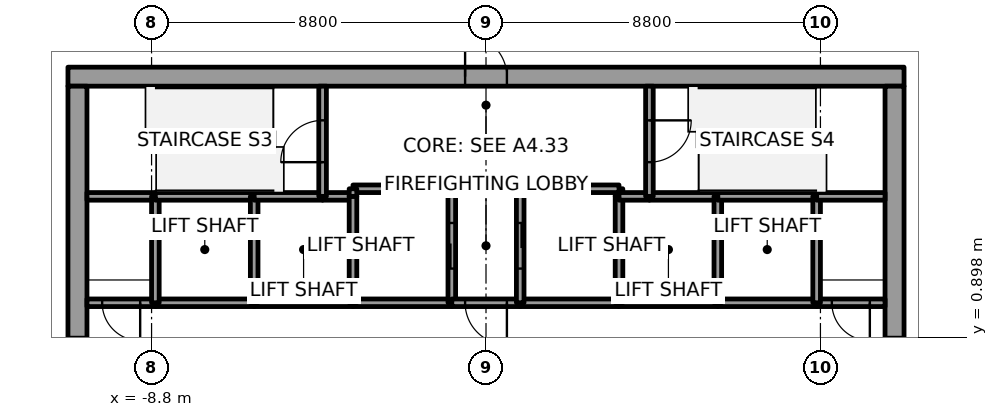
"""IFC4 building model, lengths in metres.
Left out: names, types, materials, properties, quantities, classifications, styles, units other than length and angle.
Written with IfcOpenShell. Run it as: python <this file> out.ifc"""

import sys

from ifc_helpers import new_model, si_unit, direction, frame, frame_2d, origin, place, context, subcontext, project, spatial, rectangle, extrude, element, fill, save


model = new_model("IFC4")
c1 = context("Model", 3, precision=1e-05, world=origin(), true_north=direction((0.0, 1.0)))
c2 = subcontext(c1, "Body", "Model", "MODEL_VIEW")
j1 = project(units=[si_unit("LENGTHUNIT", "METRE"), si_unit("PLANEANGLEUNIT", "RADIAN")], contexts=[c1])
p1 = place(None, origin())
s1 = spatial("IfcSite", under=j1, at=p1, CompositionType="ELEMENT")
p2 = place(p1, origin())
s2 = spatial("IfcBuilding", under=s1, at=p2, CompositionType="ELEMENT")
p3 = place(p2, frame((0.0, 0.0, 145.8)))
s3 = spatial("IfcBuildingStorey", under=s2, at=p3, CompositionType="ELEMENT", Elevation=145.8)
p4 = place(p3, frame((-11.0, 7.75, 0.0), z_axis=(0.0, 0.0, 1.0), x_axis=(1.0, 0.0, 0.0)))
e1 = element("IfcWall", 1, at=p4, inside=s3, PredefinedType="SHEAR", context=c2, shape_type="SweptSolid", body=[
    extrude(rectangle(XDim=22.0, YDim=0.5, at=frame_2d((11.0, 0.0))), origin(), (0.0, 0.0, 1.0), 4.0),
])
p5 = place(p4, frame((10.45, 0.0, 0.0)))
e2 = element("IfcOpeningElement", 2, at=p5, cuts=e1, PredefinedType="OPENING", context=c2, shape_type="SweptSolid", body=[
    extrude(rectangle(XDim=1.1, YDim=2.1, at=frame_2d((0.55, 1.05))), frame((0.0, 0.25, 0.0), z_axis=(0.0, -1.0, 0.0), x_axis=(1.0, 0.0, 0.0)), (0.0, 0.0, 1.0), 0.5),
])
p6 = place(p3, frame((-10.75, -7.5, 0.0), z_axis=(0.0, 0.0, 1.0), x_axis=(0.0, 1.0, 0.0)))
e3 = element("IfcWall", 3, at=p6, inside=s3, PredefinedType="SHEAR", context=c2, shape_type="SweptSolid", body=[
    extrude(rectangle(XDim=15.0, YDim=0.5, at=frame_2d((7.5, 0.0))), origin(), (0.0, 0.0, 1.0), 4.0),
])
p7 = place(p6, frame((6.6, 0.0, 0.0)))
e4 = element("IfcOpeningElement", 4, at=p7, cuts=e3, PredefinedType="OPENING", context=c2, shape_type="SweptSolid", body=[
    extrude(rectangle(XDim=1.8, YDim=2.1, at=frame_2d((0.9, 1.05))), frame((0.0, 0.25, 0.0), z_axis=(0.0, -1.0, 0.0), x_axis=(1.0, 0.0, 0.0)), (0.0, 0.0, 1.0), 0.5),
])
p8 = place(p3, frame((10.75, -7.5, 0.0), z_axis=(0.0, 0.0, 1.0), x_axis=(0.0, 1.0, 0.0)))
e5 = element("IfcWall", 5, at=p8, inside=s3, PredefinedType="SHEAR", context=c2, shape_type="SweptSolid", body=[
    extrude(rectangle(XDim=15.0, YDim=0.5, at=frame_2d((7.5, 0.0))), origin(), (0.0, 0.0, 1.0), 4.0),
])
p9 = place(p8, frame((6.6, 0.0, 0.0)))
e6 = element("IfcOpeningElement", 6, at=p9, cuts=e5, PredefinedType="OPENING", context=c2, shape_type="SweptSolid", body=[
    extrude(rectangle(XDim=1.8, YDim=2.1, at=frame_2d((0.9, 1.05))), frame((0.0, 0.25, 0.0), z_axis=(0.0, -1.0, 0.0), x_axis=(1.0, 0.0, 0.0)), (0.0, 0.0, 1.0), 0.5),
])
p10 = place(p3, frame((-8.7, 1.8, 0.0), z_axis=(0.0, 0.0, 1.0), x_axis=(-1.0, 0.0, 0.0)))
e7 = element("IfcWall", 7, at=p10, inside=s3, PredefinedType="SOLIDWALL", context=c2, shape_type="SweptSolid", body=[
    extrude(rectangle(XDim=1.8, YDim=0.2, at=frame_2d((0.9, 0.0))), origin(), (0.0, 0.0, 1.0), 3.85),
])
p11 = place(p10, frame((0.4, 0.0, 0.0)))
e8 = element("IfcOpeningElement", 8, at=p11, cuts=e7, PredefinedType="OPENING", context=c2, shape_type="SweptSolid", body=[
    extrude(rectangle(XDim=1.0, YDim=2.1, at=frame_2d((0.5, 1.05))), frame((0.0, 0.1, 0.0), z_axis=(0.0, -1.0, 0.0), x_axis=(1.0, 0.0, 0.0)), (0.0, 0.0, 1.0), 0.2),
])
p12 = place(p3, frame((-8.7, 4.6, 0.0), z_axis=(0.0, 0.0, 1.0), x_axis=(-1.0, 0.0, 0.0)))
e9 = element("IfcWall", 9, at=p12, inside=s3, PredefinedType="SOLIDWALL", context=c2, shape_type="SweptSolid", body=[
    extrude(rectangle(XDim=1.8, YDim=0.2, at=frame_2d((0.9, 0.0))), origin(), (0.0, 0.0, 1.0), 3.85),
])
p13 = place(p3, frame((-6.1, 1.8, 0.0), z_axis=(0.0, 0.0, 1.0), x_axis=(-1.0, 0.0, 0.0)))
e10 = element("IfcWall", 10, at=p13, inside=s3, PredefinedType="SOLIDWALL", context=c2, shape_type="SweptSolid", body=[
    extrude(rectangle(XDim=2.6, YDim=0.2, at=frame_2d((1.3, 0.0))), origin(), (0.0, 0.0, 1.0), 3.85),
])
p14 = place(p3, frame((-8.7, 1.8, 0.0), z_axis=(0.0, 0.0, 1.0), x_axis=(0.0, 1.0, 0.0)))
e11 = element("IfcWall", 11, at=p14, inside=s3, PredefinedType="SOLIDWALL", context=c2, shape_type="SweptSolid", body=[
    extrude(rectangle(XDim=2.8, YDim=0.2, at=frame_2d((1.4, 0.0))), origin(), (0.0, 0.0, 1.0), 3.85),
])
p15 = place(p3, frame((-6.1, 4.6, 0.0), z_axis=(0.0, 0.0, 1.0), x_axis=(-1.0, 0.0, 0.0)))
e12 = element("IfcWall", 12, at=p15, inside=s3, PredefinedType="SOLIDWALL", context=c2, shape_type="SweptSolid", body=[
    extrude(rectangle(XDim=2.6, YDim=0.2, at=frame_2d((1.3, 0.0))), origin(), (0.0, 0.0, 1.0), 3.85),
])
p16 = place(p3, frame((-3.5, 1.8, 0.0), z_axis=(0.0, 0.0, 1.0), x_axis=(-1.0, 0.0, 0.0)))
e13 = element("IfcWall", 13, at=p16, inside=s3, PredefinedType="SOLIDWALL", context=c2, shape_type="SweptSolid", body=[
    extrude(rectangle(XDim=2.6, YDim=0.2, at=frame_2d((1.3, 0.0))), origin(), (0.0, 0.0, 1.0), 3.85),
])
p17 = place(p3, frame((-6.1, 1.8, 0.0), z_axis=(0.0, 0.0, 1.0), x_axis=(0.0, 1.0, 0.0)))
e14 = element("IfcWall", 14, at=p17, inside=s3, PredefinedType="SOLIDWALL", context=c2, shape_type="SweptSolid", body=[
    extrude(rectangle(XDim=2.8, YDim=0.2, at=frame_2d((1.4, 0.0))), origin(), (0.0, 0.0, 1.0), 3.85),
])
p18 = place(p3, frame((-4.3, 4.6, 0.0), z_axis=(0.0, 0.0, 1.0), x_axis=(-1.0, 0.0, 0.0)))
e15 = element("IfcWall", 15, at=p18, inside=s3, PredefinedType="SOLIDWALL", context=c2, shape_type="SweptSolid", body=[
    extrude(rectangle(XDim=1.8, YDim=0.2, at=frame_2d((0.9, 0.0))), origin(), (0.0, 0.0, 1.0), 3.85),
])
p19 = place(p3, frame((-3.5, 4.6, 0.0), z_axis=(0.0, 0.0, 1.0), x_axis=(-1.0, 0.0, 0.0)))
e16 = element("IfcWall", 16, at=p19, inside=s3, PredefinedType="SOLIDWALL", context=c2, shape_type="SweptSolid", body=[
    extrude(rectangle(XDim=0.8, YDim=0.2, at=frame_2d((0.4, 0.0))), origin(), (0.0, 0.0, 1.0), 3.85),
])
p20 = place(p3, frame((-4.3, 4.6, 0.0), z_axis=(0.0, 0.0, 1.0), x_axis=(0.0, 1.0, 0.0)))
e17 = element("IfcWall", 17, at=p20, inside=s3, PredefinedType="SOLIDWALL", context=c2, shape_type="SweptSolid", body=[
    extrude(rectangle(XDim=2.9, YDim=0.2, at=frame_2d((1.45, 0.0))), origin(), (0.0, 0.0, 1.0), 3.85),
])
p21 = place(p20, frame((0.9, 0.0, 0.0)))
e18 = element("IfcOpeningElement", 18, at=p21, cuts=e17, PredefinedType="OPENING", context=c2, shape_type="SweptSolid", body=[
    extrude(rectangle(XDim=1.1, YDim=2.1, at=frame_2d((0.55, 1.05))), frame((0.0, 0.1, 0.0), z_axis=(0.0, -1.0, 0.0), x_axis=(1.0, 0.0, 0.0)), (0.0, 0.0, 1.0), 0.2),
])
p22 = place(p3, frame((-0.9, 1.8, 0.0), z_axis=(0.0, 0.0, 1.0), x_axis=(-1.0, 0.0, 0.0)))
e19 = element("IfcWall", 19, at=p22, inside=s3, PredefinedType="SOLIDWALL", context=c2, shape_type="SweptSolid", body=[
    extrude(rectangle(XDim=2.6, YDim=0.2, at=frame_2d((1.3, 0.0))), origin(), (0.0, 0.0, 1.0), 3.85),
])
p23 = place(p3, frame((-3.5, 4.6, 0.0), z_axis=(0.0, 0.0, 1.0), x_axis=(0.0, -1.0, 0.0)))
e20 = element("IfcWall", 20, at=p23, inside=s3, PredefinedType="SOLIDWALL", context=c2, shape_type="SweptSolid", body=[
    extrude(rectangle(XDim=2.8, YDim=0.2, at=frame_2d((1.4, 0.0))), origin(), (0.0, 0.0, 1.0), 3.85),
])
p24 = place(p3, frame((-0.9, 1.8, 0.0), z_axis=(0.0, 0.0, 1.0), x_axis=(0.0, 1.0, 0.0)))
e21 = element("IfcWall", 21, at=p24, inside=s3, PredefinedType="SOLIDWALL", context=c2, shape_type="SweptSolid", body=[
    extrude(rectangle(XDim=3.0, YDim=0.2, at=frame_2d((1.5, 0.0))), origin(), (0.0, 0.0, 1.0), 3.85),
])
p25 = place(p24, frame((0.9, 0.0, 0.0)))
e22 = element("IfcOpeningElement", 22, at=p25, cuts=e21, PredefinedType="OPENING", context=c2, shape_type="SweptSolid", body=[
    extrude(rectangle(XDim=1.2, YDim=2.1, at=frame_2d((0.6, 1.05))), frame((0.0, 0.1, 0.0), z_axis=(0.0, -1.0, 0.0), x_axis=(1.0, 0.0, 0.0)), (0.0, 0.0, 1.0), 0.2),
])
p26 = place(p3, frame((-0.9, 4.8, 0.0), z_axis=(0.0, 0.0, 1.0), x_axis=(-1.0, 0.0, 0.0)))
e23 = element("IfcWall", 23, at=p26, inside=s3, PredefinedType="SOLIDWALL", context=c2, shape_type="SweptSolid", body=[
    extrude(rectangle(XDim=2.6, YDim=0.2, at=frame_2d((1.3, 0.0))), origin(), (0.0, 0.0, 1.0), 3.85),
])
p27 = place(p3, frame((-3.5, 4.8, 0.0), z_axis=(0.0, 0.0, 1.0), x_axis=(0.0, -1.0, 0.0)))
e24 = element("IfcWall", 24, at=p27, inside=s3, PredefinedType="SOLIDWALL", context=c2, shape_type="SweptSolid", body=[
    extrude(rectangle(XDim=0.2, YDim=0.2, at=frame_2d((0.1, 0.0))), origin(), (0.0, 0.0, 1.0), 3.85),
])
p28 = place(p3, frame((0.9, 1.8, 0.0), z_axis=(0.0, 0.0, 1.0), x_axis=(-1.0, 0.0, 0.0)))
e25 = element("IfcWall", 25, at=p28, inside=s3, PredefinedType="SOLIDWALL", context=c2, shape_type="SweptSolid", body=[
    extrude(rectangle(XDim=1.8, YDim=0.2, at=frame_2d((0.9, 0.0))), origin(), (0.0, 0.0, 1.0), 3.85),
])
p29 = place(p28, frame((0.35, 0.0, 0.0)))
e26 = element("IfcOpeningElement", 26, at=p29, cuts=e25, PredefinedType="OPENING", context=c2, shape_type="SweptSolid", body=[
    extrude(rectangle(XDim=1.1, YDim=2.1, at=frame_2d((0.55, 1.05))), frame((0.0, 0.1, 0.0), z_axis=(0.0, -1.0, 0.0), x_axis=(1.0, 0.0, 0.0)), (0.0, 0.0, 1.0), 0.2),
])
p30 = place(p3, frame((3.5, 1.8, 0.0), z_axis=(0.0, 0.0, 1.0), x_axis=(-1.0, 0.0, 0.0)))
e27 = element("IfcWall", 27, at=p30, inside=s3, PredefinedType="SOLIDWALL", context=c2, shape_type="SweptSolid", body=[
    extrude(rectangle(XDim=2.6, YDim=0.2, at=frame_2d((1.3, 0.0))), origin(), (0.0, 0.0, 1.0), 3.85),
])
p31 = place(p3, frame((3.5, 4.6, 0.0), z_axis=(0.0, 0.0, 1.0), x_axis=(0.0, 1.0, 0.0)))
e28 = element("IfcWall", 28, at=p31, inside=s3, PredefinedType="SOLIDWALL", context=c2, shape_type="SweptSolid", body=[
    extrude(rectangle(XDim=0.2, YDim=0.2, at=frame_2d((0.1, 0.0))), origin(), (0.0, 0.0, 1.0), 3.85),
])
p32 = place(p3, frame((3.5, 4.8, 0.0), z_axis=(0.0, 0.0, 1.0), x_axis=(-1.0, 0.0, 0.0)))
e29 = element("IfcWall", 29, at=p32, inside=s3, PredefinedType="SOLIDWALL", context=c2, shape_type="SweptSolid", body=[
    extrude(rectangle(XDim=2.6, YDim=0.2, at=frame_2d((1.3, 0.0))), origin(), (0.0, 0.0, 1.0), 3.85),
])
p33 = place(p3, frame((0.9, 4.8, 0.0), z_axis=(0.0, 0.0, 1.0), x_axis=(0.0, -1.0, 0.0)))
e30 = element("IfcWall", 30, at=p33, inside=s3, PredefinedType="SOLIDWALL", context=c2, shape_type="SweptSolid", body=[
    extrude(rectangle(XDim=3.0, YDim=0.2, at=frame_2d((1.5, 0.0))), origin(), (0.0, 0.0, 1.0), 3.85),
])
p34 = place(p33, frame((0.9, 0.0, 0.0)))
e31 = element("IfcOpeningElement", 31, at=p34, cuts=e30, PredefinedType="OPENING", context=c2, shape_type="SweptSolid", body=[
    extrude(rectangle(XDim=1.2, YDim=2.1, at=frame_2d((0.6, 1.05))), frame((0.0, 0.1, 0.0), z_axis=(0.0, -1.0, 0.0), x_axis=(1.0, 0.0, 0.0)), (0.0, 0.0, 1.0), 0.2),
])
p35 = place(p3, frame((6.1, 1.8, 0.0), z_axis=(0.0, 0.0, 1.0), x_axis=(-1.0, 0.0, 0.0)))
e32 = element("IfcWall", 32, at=p35, inside=s3, PredefinedType="SOLIDWALL", context=c2, shape_type="SweptSolid", body=[
    extrude(rectangle(XDim=2.6, YDim=0.2, at=frame_2d((1.3, 0.0))), origin(), (0.0, 0.0, 1.0), 3.85),
])
p36 = place(p3, frame((3.5, 1.8, 0.0), z_axis=(0.0, 0.0, 1.0), x_axis=(0.0, 1.0, 0.0)))
e33 = element("IfcWall", 33, at=p36, inside=s3, PredefinedType="SOLIDWALL", context=c2, shape_type="SweptSolid", body=[
    extrude(rectangle(XDim=2.8, YDim=0.2, at=frame_2d((1.4, 0.0))), origin(), (0.0, 0.0, 1.0), 3.85),
])
p37 = place(p3, frame((4.3, 4.6, 0.0), z_axis=(0.0, 0.0, 1.0), x_axis=(-1.0, 0.0, 0.0)))
e34 = element("IfcWall", 34, at=p37, inside=s3, PredefinedType="SOLIDWALL", context=c2, shape_type="SweptSolid", body=[
    extrude(rectangle(XDim=0.8, YDim=0.2, at=frame_2d((0.4, 0.0))), origin(), (0.0, 0.0, 1.0), 3.85),
])
p38 = place(p3, frame((6.1, 4.6, 0.0), z_axis=(0.0, 0.0, 1.0), x_axis=(-1.0, 0.0, 0.0)))
e35 = element("IfcWall", 35, at=p38, inside=s3, PredefinedType="SOLIDWALL", context=c2, shape_type="SweptSolid", body=[
    extrude(rectangle(XDim=1.8, YDim=0.2, at=frame_2d((0.9, 0.0))), origin(), (0.0, 0.0, 1.0), 3.85),
])
p39 = place(p3, frame((4.3, 7.5, 0.0), z_axis=(0.0, 0.0, 1.0), x_axis=(0.0, -1.0, 0.0)))
e36 = element("IfcWall", 36, at=p39, inside=s3, PredefinedType="SOLIDWALL", context=c2, shape_type="SweptSolid", body=[
    extrude(rectangle(XDim=2.9, YDim=0.2, at=frame_2d((1.45, 0.0))), origin(), (0.0, 0.0, 1.0), 3.85),
])
p40 = place(p39, frame((0.9, 0.0, 0.0)))
e37 = element("IfcOpeningElement", 37, at=p40, cuts=e36, PredefinedType="OPENING", context=c2, shape_type="SweptSolid", body=[
    extrude(rectangle(XDim=1.1, YDim=2.1, at=frame_2d((0.55, 1.05))), frame((0.0, 0.1, 0.0), z_axis=(0.0, -1.0, 0.0), x_axis=(1.0, 0.0, 0.0)), (0.0, 0.0, 1.0), 0.2),
])
p41 = place(p3, frame((8.7, 1.8, 0.0), z_axis=(0.0, 0.0, 1.0), x_axis=(-1.0, 0.0, 0.0)))
e38 = element("IfcWall", 38, at=p41, inside=s3, PredefinedType="SOLIDWALL", context=c2, shape_type="SweptSolid", body=[
    extrude(rectangle(XDim=2.6, YDim=0.2, at=frame_2d((1.3, 0.0))), origin(), (0.0, 0.0, 1.0), 3.85),
])
p42 = place(p3, frame((6.1, 1.8, 0.0), z_axis=(0.0, 0.0, 1.0), x_axis=(0.0, 1.0, 0.0)))
e39 = element("IfcWall", 39, at=p42, inside=s3, PredefinedType="SOLIDWALL", context=c2, shape_type="SweptSolid", body=[
    extrude(rectangle(XDim=2.8, YDim=0.2, at=frame_2d((1.4, 0.0))), origin(), (0.0, 0.0, 1.0), 3.85),
])
p43 = place(p3, frame((8.7, 4.6, 0.0), z_axis=(0.0, 0.0, 1.0), x_axis=(-1.0, 0.0, 0.0)))
e40 = element("IfcWall", 40, at=p43, inside=s3, PredefinedType="SOLIDWALL", context=c2, shape_type="SweptSolid", body=[
    extrude(rectangle(XDim=2.6, YDim=0.2, at=frame_2d((1.3, 0.0))), origin(), (0.0, 0.0, 1.0), 3.85),
])
p44 = place(p3, frame((10.5, 1.8, 0.0), z_axis=(0.0, 0.0, 1.0), x_axis=(-1.0, 0.0, 0.0)))
e41 = element("IfcWall", 41, at=p44, inside=s3, PredefinedType="SOLIDWALL", context=c2, shape_type="SweptSolid", body=[
    extrude(rectangle(XDim=1.8, YDim=0.2, at=frame_2d((0.9, 0.0))), origin(), (0.0, 0.0, 1.0), 3.85),
])
p45 = place(p44, frame((0.4, 0.0, 0.0)))
e42 = element("IfcOpeningElement", 42, at=p45, cuts=e41, PredefinedType="OPENING", context=c2, shape_type="SweptSolid", body=[
    extrude(rectangle(XDim=1.0, YDim=2.1, at=frame_2d((0.5, 1.05))), frame((0.0, 0.1, 0.0), z_axis=(0.0, -1.0, 0.0), x_axis=(1.0, 0.0, 0.0)), (0.0, 0.0, 1.0), 0.2),
])
p46 = place(p3, frame((8.7, 4.6, 0.0), z_axis=(0.0, 0.0, 1.0), x_axis=(0.0, -1.0, 0.0)))
e43 = element("IfcWall", 43, at=p46, inside=s3, PredefinedType="SOLIDWALL", context=c2, shape_type="SweptSolid", body=[
    extrude(rectangle(XDim=2.8, YDim=0.2, at=frame_2d((1.4, 0.0))), origin(), (0.0, 0.0, 1.0), 3.85),
])
p47 = place(p3, frame((10.5, 4.6, 0.0), z_axis=(0.0, 0.0, 1.0), x_axis=(-1.0, 0.0, 0.0)))
e44 = element("IfcWall", 44, at=p47, inside=s3, PredefinedType="SOLIDWALL", context=c2, shape_type="SweptSolid", body=[
    extrude(rectangle(XDim=1.8, YDim=0.2, at=frame_2d((0.9, 0.0))), origin(), (0.0, 0.0, 1.0), 3.85),
])
p48 = place(p25, origin())
e45 = element("IfcDoor", 45, at=p48, inside=s3, OperationType="SLIDING_TO_RIGHT", PredefinedType="DOOR", context=c2, shape_type="SweptSolid", body=[
    extrude(rectangle(XDim=1.2, YDim=2.1, at=frame_2d((0.6, 1.05))), frame((0.0, 0.025, 0.0), z_axis=(0.0, -1.0, 0.0), x_axis=(1.0, 0.0, 0.0)), (0.0, 0.0, 1.0), 0.05),
])
fill(e22, e45)
p49 = place(p34, origin())
e46 = element("IfcDoor", 46, at=p49, inside=s3, OperationType="SLIDING_TO_LEFT", PredefinedType="DOOR", context=c2, shape_type="SweptSolid", body=[
    extrude(rectangle(XDim=1.2, YDim=2.1, at=frame_2d((0.6, 1.05))), frame((0.0, 0.025, 0.0), z_axis=(0.0, -1.0, 0.0), x_axis=(1.0, 0.0, 0.0)), (0.0, 0.0, 1.0), 0.05),
])
fill(e31, e46)
p50 = place(p29, origin())
e47 = element("IfcDoor", 47, at=p50, inside=s3, OperationType="SINGLE_SWING_RIGHT", PredefinedType="DOOR", context=c2, shape_type="SweptSolid", body=[
    extrude(rectangle(XDim=1.1, YDim=2.1, at=frame_2d((0.55, 1.05))), frame((0.0, 0.025, 0.0), z_axis=(0.0, -1.0, 0.0), x_axis=(1.0, 0.0, 0.0)), (0.0, 0.0, 1.0), 0.05),
])
fill(e26, e47)
p51 = place(p11, origin())
e48 = element("IfcDoor", 48, at=p51, inside=s3, OperationType="SINGLE_SWING_RIGHT", PredefinedType="DOOR", context=c2, shape_type="SweptSolid", body=[
    extrude(rectangle(XDim=1.0, YDim=2.1, at=frame_2d((0.5, 1.05))), frame((0.0, 0.025, 0.0), z_axis=(0.0, -1.0, 0.0), x_axis=(1.0, 0.0, 0.0)), (0.0, 0.0, 1.0), 0.05),
])
fill(e8, e48)
p52 = place(p45, origin())
e49 = element("IfcDoor", 49, at=p52, inside=s3, OperationType="SINGLE_SWING_LEFT", PredefinedType="DOOR", context=c2, shape_type="SweptSolid", body=[
    extrude(rectangle(XDim=1.0, YDim=2.1, at=frame_2d((0.5, 1.05))), frame((0.0, 0.025, 0.0), z_axis=(0.0, -1.0, 0.0), x_axis=(1.0, 0.0, 0.0)), (0.0, 0.0, 1.0), 0.05),
])
fill(e42, e49)
p53 = place(p21, origin())
e50 = element("IfcDoor", 50, at=p53, inside=s3, OperationType="SINGLE_SWING_RIGHT", PredefinedType="DOOR", context=c2, shape_type="SweptSolid", body=[
    extrude(rectangle(XDim=1.1, YDim=2.1, at=frame_2d((0.55, 1.05))), frame((0.0, 0.025, 0.0), z_axis=(0.0, -1.0, 0.0), x_axis=(1.0, 0.0, 0.0)), (0.0, 0.0, 1.0), 0.05),
])
fill(e18, e50)
p54 = place(p40, origin())
e51 = element("IfcDoor", 51, at=p54, inside=s3, OperationType="SINGLE_SWING_RIGHT", PredefinedType="DOOR", context=c2, shape_type="SweptSolid", body=[
    extrude(rectangle(XDim=1.1, YDim=2.1, at=frame_2d((0.55, 1.05))), frame((0.0, 0.025, 0.0), z_axis=(0.0, -1.0, 0.0), x_axis=(1.0, 0.0, 0.0)), (0.0, 0.0, 1.0), 0.05),
])
fill(e37, e51)
p55 = place(p7, origin())
e52 = element("IfcDoor", 52, at=p55, inside=s3, OperationType="DOUBLE_DOOR_SINGLE_SWING", PredefinedType="DOOR", context=c2, shape_type="SweptSolid", body=[
    extrude(rectangle(XDim=1.8, YDim=2.1, at=frame_2d((0.9, 1.05))), frame((0.0, 0.025, 0.0), z_axis=(0.0, -1.0, 0.0), x_axis=(1.0, 0.0, 0.0)), (0.0, 0.0, 1.0), 0.05),
])
fill(e4, e52)
p56 = place(p9, origin())
e53 = element("IfcDoor", 53, at=p56, inside=s3, OperationType="DOUBLE_DOOR_SINGLE_SWING", PredefinedType="DOOR", context=c2, shape_type="SweptSolid", body=[
    extrude(rectangle(XDim=1.8, YDim=2.1, at=frame_2d((0.9, 1.05))), frame((0.0, 0.025, 0.0), z_axis=(0.0, -1.0, 0.0), x_axis=(1.0, 0.0, 0.0)), (0.0, 0.0, 1.0), 0.05),
])
fill(e6, e53)
p57 = place(p5, origin())
e54 = element("IfcDoor", 54, at=p57, inside=s3, OperationType="SINGLE_SWING_RIGHT", PredefinedType="DOOR", context=c2, shape_type="SweptSolid", body=[
    extrude(rectangle(XDim=1.1, YDim=2.1, at=frame_2d((0.55, 1.05))), frame((0.0, 0.025, 0.0), z_axis=(0.0, -1.0, 0.0), x_axis=(1.0, 0.0, 0.0)), (0.0, 0.0, 1.0), 0.05),
])
fill(e2, e54)
save(model, sys.argv[1])
